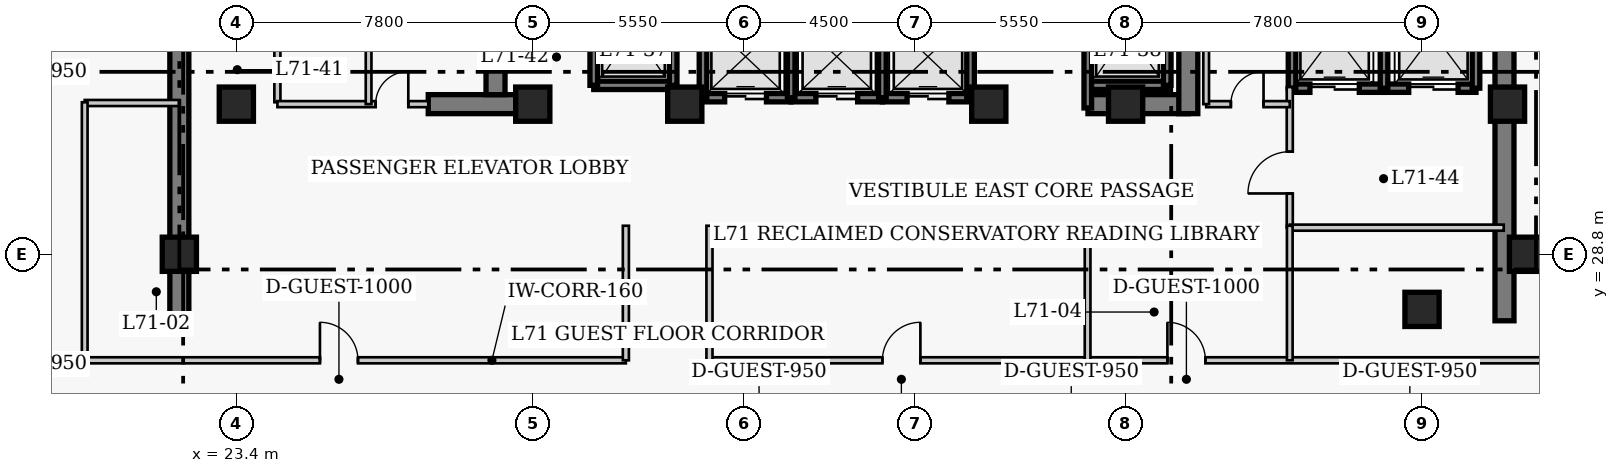
"""IFC4 building model, lengths in metres.
Left out: names, types, materials, properties, quantities, classifications, styles, units other than length and angle.
Written with IfcOpenShell. Run it as: python <this file> out.ifc"""

import sys

from ifc_helpers import new_model, si_unit, direction, frame, frame_2d, origin, origin_2d, place, context, subcontext, project, spatial, rectangle, extrude, element, fill, save


model = new_model("IFC4")
c1 = context("Model", 3, precision=1e-05, world=origin(), true_north=direction((0.0, 1.0)))
c2 = subcontext(c1, "Body", "Model", "MODEL_VIEW")
j1 = project(units=[si_unit("LENGTHUNIT", "METRE"), si_unit("PLANEANGLEUNIT", "RADIAN")], contexts=[c1])
p1 = place(None, origin())
s1 = spatial("IfcSite", under=j1, at=p1, CompositionType="ELEMENT")
p2 = place(p1, origin())
s2 = spatial("IfcBuilding", under=s1, at=p2, CompositionType="ELEMENT")
p3 = place(p2, frame((0.0, 0.0, 285.4)))
s3 = spatial("IfcBuildingStorey", under=s2, at=p3, CompositionType="ELEMENT", Elevation=285.4)
for number, where, z_axis, x_axis in (
    (1, (21.9, 27.05, 0.0), (0.0, 0.0, 1.0), (0.0, 1.0, 0.0)),
    (2, (56.77, 27.05, 0.0), (0.0, 0.0, 1.0), (0.0, 1.0, 0.0)),
):
    element("IfcWall", number, at=place(p3, frame(where, z_axis=z_axis, x_axis=x_axis)), inside=s3, PredefinedType="SHEAR", context=c2, shape_type="SweptSolid", body=[
        extrude(rectangle(XDim=13.52, YDim=0.5, at=frame_2d((6.76, 0.0))), origin(), (0.0, 0.0, 1.0), 4.0),
    ])
p4 = place(p3, frame((28.45, 32.75, 0.0), z_axis=(0.0, 0.0, 1.0), x_axis=(1.0, 0.0, 0.0)))
e3 = element("IfcWall", 3, at=p4, inside=s3, PredefinedType="SHEAR", context=c2, shape_type="SweptSolid", body=[
    extrude(rectangle(XDim=2.4, YDim=0.5, at=frame_2d((1.2, 0.0))), origin(), (0.0, 0.0, 1.0), 4.0),
])
p5 = place(p3, frame((45.81, 32.75, 0.0), z_axis=(0.0, 0.0, 1.0), x_axis=(1.0, 0.0, 0.0)))
e4 = element("IfcWall", 4, at=p5, inside=s3, PredefinedType="SHEAR", context=c2, shape_type="SweptSolid", body=[
    extrude(rectangle(XDim=2.64, YDim=0.5, at=frame_2d((1.32, 0.0))), origin(), (0.0, 0.0, 1.0), 4.0),
])
p6 = place(p3, frame((30.22, 33.0, 0.0), z_axis=(0.0, 0.0, 1.0), x_axis=(0.0, 1.0, 0.0)))
e5 = element("IfcWall", 5, at=p6, inside=s3, PredefinedType="SHEAR", context=c2, shape_type="SweptSolid", body=[
    extrude(rectangle(XDim=7.32, YDim=0.5, at=frame_2d((3.66, 0.0))), origin(), (0.0, 0.0, 1.0), 4.0),
])
p7 = place(p3, frame((48.45, 32.5, 0.0), z_axis=(0.0, 0.0, 1.0), x_axis=(0.0, 1.0, 0.0)))
e6 = element("IfcWall", 6, at=p7, inside=s3, PredefinedType="SHEAR", context=c2, shape_type="SweptSolid", body=[
    extrude(rectangle(XDim=7.82, YDim=0.5, at=frame_2d((3.91, 0.0))), origin(), (0.0, 0.0, 1.0), 4.0),
])
p8 = place(p7, frame((5.7, 0.0, 0.0)))
e7 = element("IfcOpeningElement", 7, at=p8, cuts=e6, PredefinedType="OPENING", context=c2, shape_type="SweptSolid", body=[
    extrude(rectangle(XDim=1.1, YDim=2.15, at=frame_2d((0.55, 1.075))), frame((0.0, 0.26, 0.0), z_axis=(0.0, -1.0, 0.0), x_axis=(1.0, 0.0, 0.0)), (0.0, 0.0, 1.0), 0.52),
])
for number, where, z_axis, x_axis in (
    (8, (21.9, 28.8, 0.0), (0.0, 0.0, 1.0), (1.0, 0.0, 0.0)),
    (9, (57.35, 28.8, 0.0), (0.0, 0.0, 1.0), (1.0, 0.0, 0.0)),
    (10, (23.4, 32.75, 0.0), (0.0, 0.0, 1.0), (1.0, 0.0, 0.0)),
    (11, (31.2, 32.75, 0.0), (0.0, 0.0, 1.0), (1.0, 0.0, 0.0)),
    (12, (35.2, 32.75, 0.0), (0.0, 0.0, 1.0), (1.0, 0.0, 0.0)),
    (13, (43.2, 32.75, 0.0), (0.0, 0.0, 1.0), (1.0, 0.0, 0.0)),
    (14, (46.8, 32.75, 0.0), (0.0, 0.0, 1.0), (1.0, 0.0, 0.0)),
    (15, (54.6, 27.35, 0.0), (0.0, 0.0, 1.0), (1.0, 0.0, 0.0)),
    (16, (56.85, 32.75, 0.0), (0.0, 0.0, 1.0), (1.0, 0.0, 0.0)),
):
    element("IfcColumn", number, at=place(p3, frame(where, z_axis=z_axis, x_axis=x_axis)), inside=s3, PredefinedType="COLUMN", context=c2, shape_type="SweptSolid", body=[
        extrude(rectangle(XDim=0.9, YDim=0.9, at=origin_2d()), origin(), (0.0, 0.0, 1.0), 4.0),
    ])
p9 = place(p3, frame((35.68, 32.92, 0.0), z_axis=(0.0, 0.0, 1.0), x_axis=(1.0, 0.0, 0.0)))
e17 = element("IfcWall", 17, at=p9, inside=s3, PredefinedType="SHEAR", context=c2, shape_type="SweptSolid", body=[
    extrude(rectangle(XDim=2.32, YDim=0.22, at=frame_2d((1.16, 0.0))), origin(), (0.0, 0.0, 1.0), 4.0),
])
p10 = place(p9, frame((0.57, 0.0, 0.0)))
e18 = element("IfcOpeningElement", 18, at=p10, cuts=e17, PredefinedType="OPENING", context=c2, shape_type="SweptSolid", body=[
    extrude(rectangle(XDim=1.1, YDim=2.15, at=frame_2d((0.55, 1.075))), frame((0.0, 0.12, 0.0), z_axis=(0.0, -1.0, 0.0), x_axis=(1.0, 0.0, 0.0)), (0.0, 0.0, 1.0), 0.24),
])
p11 = place(p3, frame((35.68, 32.92, 0.0), z_axis=(0.0, 0.0, 1.0), x_axis=(0.0, 1.0, 0.0)))
e19 = element("IfcWall", 19, at=p11, inside=s3, PredefinedType="SHEAR", context=c2, shape_type="SweptSolid", body=[
    extrude(rectangle(XDim=2.16, YDim=0.2, at=frame_2d((1.08, 0.0))), origin(), (0.0, 0.0, 1.0), 4.0),
])
p12 = place(p3, frame((38.0, 32.92, 0.0), z_axis=(0.0, 0.0, 1.0), x_axis=(1.0, 0.0, 0.0)))
e20 = element("IfcWall", 20, at=p12, inside=s3, PredefinedType="SHEAR", context=c2, shape_type="SweptSolid", body=[
    extrude(rectangle(XDim=2.4, YDim=0.22, at=frame_2d((1.2, 0.0))), origin(), (0.0, 0.0, 1.0), 4.0),
])
p13 = place(p12, frame((0.65, 0.0, 0.0)))
e21 = element("IfcOpeningElement", 21, at=p13, cuts=e20, PredefinedType="OPENING", context=c2, shape_type="SweptSolid", body=[
    extrude(rectangle(XDim=1.1, YDim=2.15, at=frame_2d((0.55, 1.075))), frame((0.0, 0.12, 0.0), z_axis=(0.0, -1.0, 0.0), x_axis=(1.0, 0.0, 0.0)), (0.0, 0.0, 1.0), 0.24),
])
p14 = place(p3, frame((38.0, 32.92, 0.0), z_axis=(0.0, 0.0, 1.0), x_axis=(0.0, 1.0, 0.0)))
e22 = element("IfcWall", 22, at=p14, inside=s3, PredefinedType="SHEAR", context=c2, shape_type="SweptSolid", body=[
    extrude(rectangle(XDim=2.16, YDim=0.2, at=frame_2d((1.08, 0.0))), origin(), (0.0, 0.0, 1.0), 4.0),
])
p15 = place(p3, frame((40.4, 32.92, 0.0), z_axis=(0.0, 0.0, 1.0), x_axis=(1.0, 0.0, 0.0)))
e23 = element("IfcWall", 23, at=p15, inside=s3, PredefinedType="SHEAR", context=c2, shape_type="SweptSolid", body=[
    extrude(rectangle(XDim=2.32, YDim=0.22, at=frame_2d((1.16, 0.0))), origin(), (0.0, 0.0, 1.0), 4.0),
])
p16 = place(p15, frame((0.65, 0.0, 0.0)))
e24 = element("IfcOpeningElement", 24, at=p16, cuts=e23, PredefinedType="OPENING", context=c2, shape_type="SweptSolid", body=[
    extrude(rectangle(XDim=1.1, YDim=2.15, at=frame_2d((0.55, 1.075))), frame((0.0, 0.12, 0.0), z_axis=(0.0, -1.0, 0.0), x_axis=(1.0, 0.0, 0.0)), (0.0, 0.0, 1.0), 0.24),
])
for number, where, z_axis, x_axis in (
    (25, (40.4, 32.92, 0.0), (0.0, 0.0, 1.0), (0.0, 1.0, 0.0)),
    (26, (42.72, 32.92, 0.0), (0.0, 0.0, 1.0), (0.0, 1.0, 0.0)),
):
    element("IfcWall", number, at=place(p3, frame(where, z_axis=z_axis, x_axis=x_axis)), inside=s3, PredefinedType="SHEAR", context=c2, shape_type="SweptSolid", body=[
        extrude(rectangle(XDim=2.16, YDim=0.2, at=frame_2d((1.08, 0.0))), origin(), (0.0, 0.0, 1.0), 4.0),
    ])
p17 = place(p3, frame((51.18, 33.17, 0.0), z_axis=(0.0, 0.0, 1.0), x_axis=(1.0, 0.0, 0.0)))
e27 = element("IfcWall", 27, at=p17, inside=s3, PredefinedType="SHEAR", context=c2, shape_type="SweptSolid", body=[
    extrude(rectangle(XDim=2.42, YDim=0.22, at=frame_2d((1.21, 0.0))), origin(), (0.0, 0.0, 1.0), 4.0),
])
p18 = place(p17, frame((0.47, 0.0, 0.0)))
e28 = element("IfcOpeningElement", 28, at=p18, cuts=e27, PredefinedType="OPENING", context=c2, shape_type="SweptSolid", body=[
    extrude(rectangle(XDim=1.3, YDim=2.15, at=frame_2d((0.65, 1.075))), frame((0.0, 0.12, 0.0), z_axis=(0.0, -1.0, 0.0), x_axis=(1.0, 0.0, 0.0)), (0.0, 0.0, 1.0), 0.24),
])
p19 = place(p3, frame((51.18, 33.17, 0.0), z_axis=(0.0, 0.0, 1.0), x_axis=(0.0, 1.0, 0.0)))
e29 = element("IfcWall", 29, at=p19, inside=s3, PredefinedType="SHEAR", context=c2, shape_type="SweptSolid", body=[
    extrude(rectangle(XDim=2.86, YDim=0.2, at=frame_2d((1.43, 0.0))), origin(), (0.0, 0.0, 1.0), 4.0),
])
p20 = place(p3, frame((53.6, 33.17, 0.0), z_axis=(0.0, 0.0, 1.0), x_axis=(1.0, 0.0, 0.0)))
e30 = element("IfcWall", 30, at=p20, inside=s3, PredefinedType="SHEAR", context=c2, shape_type="SweptSolid", body=[
    extrude(rectangle(XDim=2.42, YDim=0.22, at=frame_2d((1.21, 0.0))), origin(), (0.0, 0.0, 1.0), 4.0),
])
p21 = place(p20, frame((0.65, 0.0, 0.0)))
e31 = element("IfcOpeningElement", 31, at=p21, cuts=e30, PredefinedType="OPENING", context=c2, shape_type="SweptSolid", body=[
    extrude(rectangle(XDim=1.3, YDim=2.15, at=frame_2d((0.65, 1.075))), frame((0.0, 0.12, 0.0), z_axis=(0.0, -1.0, 0.0), x_axis=(1.0, 0.0, 0.0)), (0.0, 0.0, 1.0), 0.24),
])
for number, where, z_axis, x_axis in (
    (32, (53.6, 33.17, 0.0), (0.0, 0.0, 1.0), (0.0, 1.0, 0.0)),
    (33, (56.02, 33.17, 0.0), (0.0, 0.0, 1.0), (0.0, 1.0, 0.0)),
):
    element("IfcWall", number, at=place(p3, frame(where, z_axis=z_axis, x_axis=x_axis)), inside=s3, PredefinedType="SHEAR", context=c2, shape_type="SweptSolid", body=[
        extrude(rectangle(XDim=2.86, YDim=0.2, at=frame_2d((1.43, 0.0))), origin(), (0.0, 0.0, 1.0), 4.0),
    ])
p22 = place(p3, frame((32.805, 33.245, 0.0), z_axis=(0.0, 0.0, 1.0), x_axis=(1.0, 0.0, 0.0)))
e34 = element("IfcWall", 34, at=p22, inside=s3, PredefinedType="SHEAR", context=c2, shape_type="SweptSolid", body=[
    extrude(rectangle(XDim=2.09, YDim=0.22, at=frame_2d((1.045, 0.0))), origin(), (0.0, 0.0, 1.0), 4.0),
])
for number, where, z_axis, x_axis in (
    (35, (32.805, 33.245, 0.0), (0.0, 0.0, 1.0), (0.0, 1.0, 0.0)),
    (36, (34.895, 33.245, 0.0), (0.0, 0.0, 1.0), (0.0, 1.0, 0.0)),
):
    element("IfcWall", number, at=place(p3, frame(where, z_axis=z_axis, x_axis=x_axis)), inside=s3, PredefinedType="SHEAR", context=c2, shape_type="SweptSolid", body=[
        extrude(rectangle(XDim=2.91, YDim=0.2, at=frame_2d((1.455, 0.0))), origin(), (0.0, 0.0, 1.0), 4.0),
    ])
p23 = place(p3, frame((45.805, 33.245, 0.0), z_axis=(0.0, 0.0, 1.0), x_axis=(1.0, 0.0, 0.0)))
e37 = element("IfcWall", 37, at=p23, inside=s3, PredefinedType="SHEAR", context=c2, shape_type="SweptSolid", body=[
    extrude(rectangle(XDim=2.09, YDim=0.22, at=frame_2d((1.045, 0.0))), origin(), (0.0, 0.0, 1.0), 4.0),
])
p24 = place(p3, frame((45.805, 32.65, 0.0), z_axis=(0.0, 0.0, 1.0), x_axis=(0.0, 1.0, 0.0)))
e38 = element("IfcWall", 38, at=p24, inside=s3, PredefinedType="SHEAR", context=c2, shape_type="SweptSolid", body=[
    extrude(rectangle(XDim=3.505, YDim=0.2, at=frame_2d((1.752, 0.0))), origin(), (0.0, 0.0, 1.0), 4.0),
])
p25 = place(p3, frame((47.895, 33.245, 0.0), z_axis=(0.0, 0.0, 1.0), x_axis=(0.0, 1.0, 0.0)))
e39 = element("IfcWall", 39, at=p25, inside=s3, PredefinedType="SHEAR", context=c2, shape_type="SweptSolid", body=[
    extrude(rectangle(XDim=2.91, YDim=0.2, at=frame_2d((1.455, 0.0))), origin(), (0.0, 0.0, 1.0), 4.0),
])
p26 = place(p3, frame((24.48, 32.8, 0.0), z_axis=(0.0, 0.0, 1.0), x_axis=(0.0, 1.0, 0.0)))
e40 = element("IfcWall", 40, at=p26, inside=s3, PredefinedType="PARTITIONING", context=c2, shape_type="SweptSolid", body=[
    extrude(rectangle(XDim=3.57, YDim=0.16, at=frame_2d((1.785, 0.0))), origin(), (0.0, 0.0, 1.0), 3.76),
])
p27 = place(p26, frame((1.604, 0.0, 0.0)))
e41 = element("IfcOpeningElement", 41, at=p27, cuts=e40, PredefinedType="OPENING", context=c2, shape_type="SweptSolid", body=[
    extrude(rectangle(XDim=0.9, YDim=2.1, at=frame_2d((0.45, 1.05))), frame((0.0, 0.09, 0.0), z_axis=(0.0, -1.0, 0.0), x_axis=(1.0, 0.0, 0.0)), (0.0, 0.0, 1.0), 0.18),
])
p28 = place(p3, frame((51.12, 29.5, 0.0), z_axis=(0.0, 0.0, 1.0), x_axis=(0.0, 1.0, 0.0)))
e42 = element("IfcWall", 42, at=p28, inside=s3, PredefinedType="PARTITIONING", context=c2, shape_type="SweptSolid", body=[
    extrude(rectangle(XDim=3.7, YDim=0.16, at=frame_2d((1.85, 0.0))), origin(), (0.0, 0.0, 1.0), 3.76),
])
p29 = place(p28, frame((0.9, 0.0, 0.0)))
e43 = element("IfcOpeningElement", 43, at=p29, cuts=e42, PredefinedType="OPENING", context=c2, shape_type="SweptSolid", body=[
    extrude(rectangle(XDim=1.1, YDim=2.15, at=frame_2d((0.55, 1.075))), frame((0.0, 0.09, 0.0), z_axis=(0.0, -1.0, 0.0), x_axis=(1.0, 0.0, 0.0)), (0.0, 0.0, 1.0), 0.18),
])
p30 = place(p3, frame((51.12, 29.5, 0.0), z_axis=(0.0, 0.0, 1.0), x_axis=(1.0, 0.0, 0.0)))
e44 = element("IfcWall", 44, at=p30, inside=s3, PredefinedType="PARTITIONING", context=c2, shape_type="SweptSolid", body=[
    extrude(rectangle(XDim=5.63, YDim=0.16, at=frame_2d((2.815, 0.0))), origin(), (0.0, 0.0, 1.0), 3.76),
])
p31 = place(p3, frame((24.48, 32.75, 0.0), z_axis=(0.0, 0.0, 1.0), x_axis=(1.0, 0.0, 0.0)))
e45 = element("IfcWall", 45, at=p31, inside=s3, PredefinedType="PARTITIONING", context=c2, shape_type="SweptSolid", body=[
    extrude(rectangle(XDim=3.97, YDim=0.16, at=frame_2d((1.985, 0.0))), origin(), (0.0, 0.0, 1.0), 3.76),
])
p32 = place(p31, frame((2.585, 0.0, 0.0)))
e46 = element("IfcOpeningElement", 46, at=p32, cuts=e45, PredefinedType="OPENING", context=c2, shape_type="SweptSolid", body=[
    extrude(rectangle(XDim=0.86, YDim=2.05, at=frame_2d((0.43, 1.025))), frame((0.0, 0.09, 0.0), z_axis=(0.0, -1.0, 0.0), x_axis=(1.0, 0.0, 0.0)), (0.0, 0.0, 1.0), 0.18),
])
p33 = place(p3, frame((48.92, 32.75, 0.0), z_axis=(0.0, 0.0, 1.0), x_axis=(1.0, 0.0, 0.0)))
e47 = element("IfcWall", 47, at=p33, inside=s3, PredefinedType="PARTITIONING", context=c2, shape_type="SweptSolid", body=[
    extrude(rectangle(XDim=2.2, YDim=0.16, at=frame_2d((1.1, 0.0))), origin(), (0.0, 0.0, 1.0), 3.76),
])
p34 = place(p33, frame((0.65, 0.0, 0.0)))
e48 = element("IfcOpeningElement", 48, at=p34, cuts=e47, PredefinedType="OPENING", context=c2, shape_type="SweptSolid", body=[
    extrude(rectangle(XDim=0.86, YDim=2.05, at=frame_2d((0.43, 1.025))), frame((0.0, 0.09, 0.0), z_axis=(0.0, -1.0, 0.0), x_axis=(1.0, 0.0, 0.0)), (0.0, 0.0, 1.0), 0.18),
])
for number, where, z_axis, x_axis in (
    (49, (48.92, 32.75, 0.0), (0.0, 0.0, 1.0), (0.0, 1.0, 0.0)),
    (50, (26.88, 32.75, 0.0), (0.0, 0.0, 1.0), (0.0, 1.0, 0.0)),
):
    element("IfcWall", number, at=place(p3, frame(where, z_axis=z_axis, x_axis=x_axis)), inside=s3, PredefinedType="PARTITIONING", context=c2, shape_type="SweptSolid", body=[
        extrude(rectangle(XDim=3.62, YDim=0.15, at=frame_2d((1.81, 0.0))), origin(), (0.0, 0.0, 1.0), 3.76),
    ])
p35 = place(p3, frame((19.35, 26.01, 0.0), z_axis=(0.0, 0.0, 1.0), x_axis=(1.0, 0.0, 0.0)))
e51 = element("IfcWall", 51, at=p35, inside=s3, PredefinedType="PARTITIONING", context=c2, shape_type="SweptSolid", body=[
    extrude(rectangle(XDim=14.3, YDim=0.16, at=frame_2d((7.15, 0.0))), origin(), (0.0, 0.0, 1.0), 3.76),
])
p36 = place(p35, frame((6.25, 0.0, 0.0)))
e52 = element("IfcOpeningElement", 52, at=p36, cuts=e51, PredefinedType="OPENING", context=c2, shape_type="SweptSolid", body=[
    extrude(rectangle(XDim=1.0, YDim=2.15, at=frame_2d((0.5, 1.075))), frame((0.0, 0.09, 0.0), z_axis=(0.0, -1.0, 0.0), x_axis=(1.0, 0.0, 0.0)), (0.0, 0.0, 1.0), 0.18),
])
p37 = place(p3, frame((35.85, 26.01, 0.0), z_axis=(0.0, 0.0, 1.0), x_axis=(1.0, 0.0, 0.0)))
e53 = element("IfcWall", 53, at=p37, inside=s3, PredefinedType="PARTITIONING", context=c2, shape_type="SweptSolid", body=[
    extrude(rectangle(XDim=22.45, YDim=0.16, at=frame_2d((11.225, 0.0))), origin(), (0.0, 0.0, 1.0), 3.76),
])
p38 = place(p37, frame((4.55, 0.0, 0.0)))
e54 = element("IfcOpeningElement", 54, at=p38, cuts=e53, PredefinedType="OPENING", context=c2, shape_type="SweptSolid", body=[
    extrude(rectangle(XDim=1.0, YDim=2.15, at=frame_2d((0.5, 1.075))), frame((0.0, 0.09, 0.0), z_axis=(0.0, -1.0, 0.0), x_axis=(1.0, 0.0, 0.0)), (0.0, 0.0, 1.0), 0.18),
])
p39 = place(p37, frame((12.05, 0.0, 0.0)))
e55 = element("IfcOpeningElement", 55, at=p39, cuts=e53, PredefinedType="OPENING", context=c2, shape_type="SweptSolid", body=[
    extrude(rectangle(XDim=1.0, YDim=2.15, at=frame_2d((0.5, 1.075))), frame((0.0, 0.09, 0.0), z_axis=(0.0, -1.0, 0.0), x_axis=(1.0, 0.0, 0.0)), (0.0, 0.0, 1.0), 0.18),
])
for number, where, z_axis, x_axis in (
    (56, (33.65, 26.01, 0.0), (0.0, 0.0, 1.0), (0.0, 1.0, 0.0)),
    (57, (35.85, 26.01, 0.0), (0.0, 0.0, 1.0), (0.0, 1.0, 0.0)),
):
    element("IfcWall", number, at=place(p3, frame(where, z_axis=z_axis, x_axis=x_axis)), inside=s3, PredefinedType="PARTITIONING", context=c2, shape_type="SweptSolid", body=[
        extrude(rectangle(XDim=3.54, YDim=0.16, at=frame_2d((1.77, 0.0))), origin(), (0.0, 0.0, 1.0), 3.76),
    ])
p40 = place(p3, frame((19.41, 32.78, 0.0), z_axis=(0.0, 0.0, 1.0), x_axis=(1.0, 0.0, 0.0)))
e58 = element("IfcWall", 58, at=p40, inside=s3, PredefinedType="PARTITIONING", context=c2, shape_type="SweptSolid", body=[
    extrude(rectangle(XDim=2.49, YDim=0.16, at=frame_2d((1.245, 0.0))), origin(), (0.0, 0.0, 1.0), 3.76),
])
p41 = place(p3, frame((19.41, 26.01, 0.0), z_axis=(0.0, 0.0, 1.0), x_axis=(0.0, 1.0, 0.0)))
e59 = element("IfcWall", 59, at=p41, inside=s3, PredefinedType="PARTITIONING", context=c2, shape_type="SweptSolid", body=[
    extrude(rectangle(XDim=6.79, YDim=0.15, at=frame_2d((3.395, 0.0))), origin(), (0.0, 0.0, 1.0), 3.76),
])
for number, where, z_axis, x_axis in (
    (60, (45.8, 26.01, 0.0), (0.0, 0.0, 1.0), (0.0, 1.0, 0.0)),
    (61, (51.12, 26.01, 0.0), (0.0, 0.0, 1.0), (0.0, 1.0, 0.0)),
):
    element("IfcWall", number, at=place(p3, frame(where, z_axis=z_axis, x_axis=x_axis)), inside=s3, PredefinedType="PARTITIONING", context=c2, shape_type="SweptSolid", body=[
        extrude(rectangle(XDim=3.54, YDim=0.15, at=frame_2d((1.77, 0.0))), origin(), (0.0, 0.0, 1.0), 3.76),
    ])
p42 = place(p10, origin())
e62 = element("IfcDoor", 62, at=p42, inside=s3, OperationType="DOUBLE_DOOR_SLIDING", PredefinedType="DOOR", context=c2, shape_type="SweptSolid", body=[
    extrude(rectangle(XDim=1.1, YDim=2.15, at=frame_2d((0.55, 1.075))), frame((0.0, 0.025, 0.0), z_axis=(0.0, -1.0, 0.0), x_axis=(1.0, 0.0, 0.0)), (0.0, 0.0, 1.0), 0.05),
])
fill(e18, e62)
p43 = place(p13, origin())
e63 = element("IfcDoor", 63, at=p43, inside=s3, OperationType="DOUBLE_DOOR_SLIDING", PredefinedType="DOOR", context=c2, shape_type="SweptSolid", body=[
    extrude(rectangle(XDim=1.1, YDim=2.15, at=frame_2d((0.55, 1.075))), frame((0.0, 0.025, 0.0), z_axis=(0.0, -1.0, 0.0), x_axis=(1.0, 0.0, 0.0)), (0.0, 0.0, 1.0), 0.05),
])
fill(e21, e63)
p44 = place(p16, origin())
e64 = element("IfcDoor", 64, at=p44, inside=s3, OperationType="DOUBLE_DOOR_SLIDING", PredefinedType="DOOR", context=c2, shape_type="SweptSolid", body=[
    extrude(rectangle(XDim=1.1, YDim=2.15, at=frame_2d((0.55, 1.075))), frame((0.0, 0.025, 0.0), z_axis=(0.0, -1.0, 0.0), x_axis=(1.0, 0.0, 0.0)), (0.0, 0.0, 1.0), 0.05),
])
fill(e24, e64)
p45 = place(p18, origin())
e65 = element("IfcDoor", 65, at=p45, inside=s3, OperationType="DOUBLE_DOOR_SLIDING", PredefinedType="DOOR", context=c2, shape_type="SweptSolid", body=[
    extrude(rectangle(XDim=1.3, YDim=2.15, at=frame_2d((0.65, 1.075))), frame((0.0, 0.025, 0.0), z_axis=(0.0, -1.0, 0.0), x_axis=(1.0, 0.0, 0.0)), (0.0, 0.0, 1.0), 0.05),
])
fill(e28, e65)
p46 = place(p21, origin())
e66 = element("IfcDoor", 66, at=p46, inside=s3, OperationType="DOUBLE_DOOR_SLIDING", PredefinedType="DOOR", context=c2, shape_type="SweptSolid", body=[
    extrude(rectangle(XDim=1.3, YDim=2.15, at=frame_2d((0.65, 1.075))), frame((0.0, 0.025, 0.0), z_axis=(0.0, -1.0, 0.0), x_axis=(1.0, 0.0, 0.0)), (0.0, 0.0, 1.0), 0.05),
])
fill(e31, e66)
p47 = place(p29, origin())
e67 = element("IfcDoor", 67, at=p47, inside=s3, OperationType="SINGLE_SWING_LEFT", PredefinedType="DOOR", context=c2, shape_type="SweptSolid", body=[
    extrude(rectangle(XDim=1.1, YDim=2.15, at=frame_2d((0.55, 1.075))), frame((0.0, 0.025, 0.0), z_axis=(0.0, -1.0, 0.0), x_axis=(1.0, 0.0, 0.0)), (0.0, 0.0, 1.0), 0.05),
])
fill(e43, e67)
p48 = place(p32, origin())
e68 = element("IfcDoor", 68, at=p48, inside=s3, OperationType="SINGLE_SWING_RIGHT", PredefinedType="DOOR", context=c2, shape_type="SweptSolid", body=[
    extrude(rectangle(XDim=0.86, YDim=2.05, at=frame_2d((0.43, 1.025))), frame((0.0, 0.025, 0.0), z_axis=(0.0, -1.0, 0.0), x_axis=(1.0, 0.0, 0.0)), (0.0, 0.0, 1.0), 0.05),
])
fill(e46, e68)
p49 = place(p34, origin())
e69 = element("IfcDoor", 69, at=p49, inside=s3, OperationType="SINGLE_SWING_RIGHT", PredefinedType="DOOR", context=c2, shape_type="SweptSolid", body=[
    extrude(rectangle(XDim=0.86, YDim=2.05, at=frame_2d((0.43, 1.025))), frame((0.0, 0.025, 0.0), z_axis=(0.0, -1.0, 0.0), x_axis=(1.0, 0.0, 0.0)), (0.0, 0.0, 1.0), 0.05),
])
fill(e48, e69)
p50 = place(p36, origin())
e70 = element("IfcDoor", 70, at=p50, inside=s3, OperationType="SINGLE_SWING_LEFT", PredefinedType="DOOR", context=c2, shape_type="SweptSolid", body=[
    extrude(rectangle(XDim=1.0, YDim=2.15, at=frame_2d((0.5, 1.075))), frame((0.0, 0.025, 0.0), z_axis=(0.0, -1.0, 0.0), x_axis=(1.0, 0.0, 0.0)), (0.0, 0.0, 1.0), 0.05),
])
fill(e52, e70)
p51 = place(p38, origin())
e71 = element("IfcDoor", 71, at=p51, inside=s3, OperationType="SINGLE_SWING_RIGHT", PredefinedType="DOOR", context=c2, shape_type="SweptSolid", body=[
    extrude(rectangle(XDim=1.0, YDim=2.15, at=frame_2d((0.5, 1.075))), frame((0.0, 0.025, 0.0), z_axis=(0.0, -1.0, 0.0), x_axis=(1.0, 0.0, 0.0)), (0.0, 0.0, 1.0), 0.05),
])
fill(e54, e71)
p52 = place(p39, origin())
e72 = element("IfcDoor", 72, at=p52, inside=s3, OperationType="SINGLE_SWING_LEFT", PredefinedType="DOOR", context=c2, shape_type="SweptSolid", body=[
    extrude(rectangle(XDim=1.0, YDim=2.15, at=frame_2d((0.5, 1.075))), frame((0.0, 0.025, 0.0), z_axis=(0.0, -1.0, 0.0), x_axis=(1.0, 0.0, 0.0)), (0.0, 0.0, 1.0), 0.05),
])
fill(e55, e72)
save(model, sys.argv[1])
